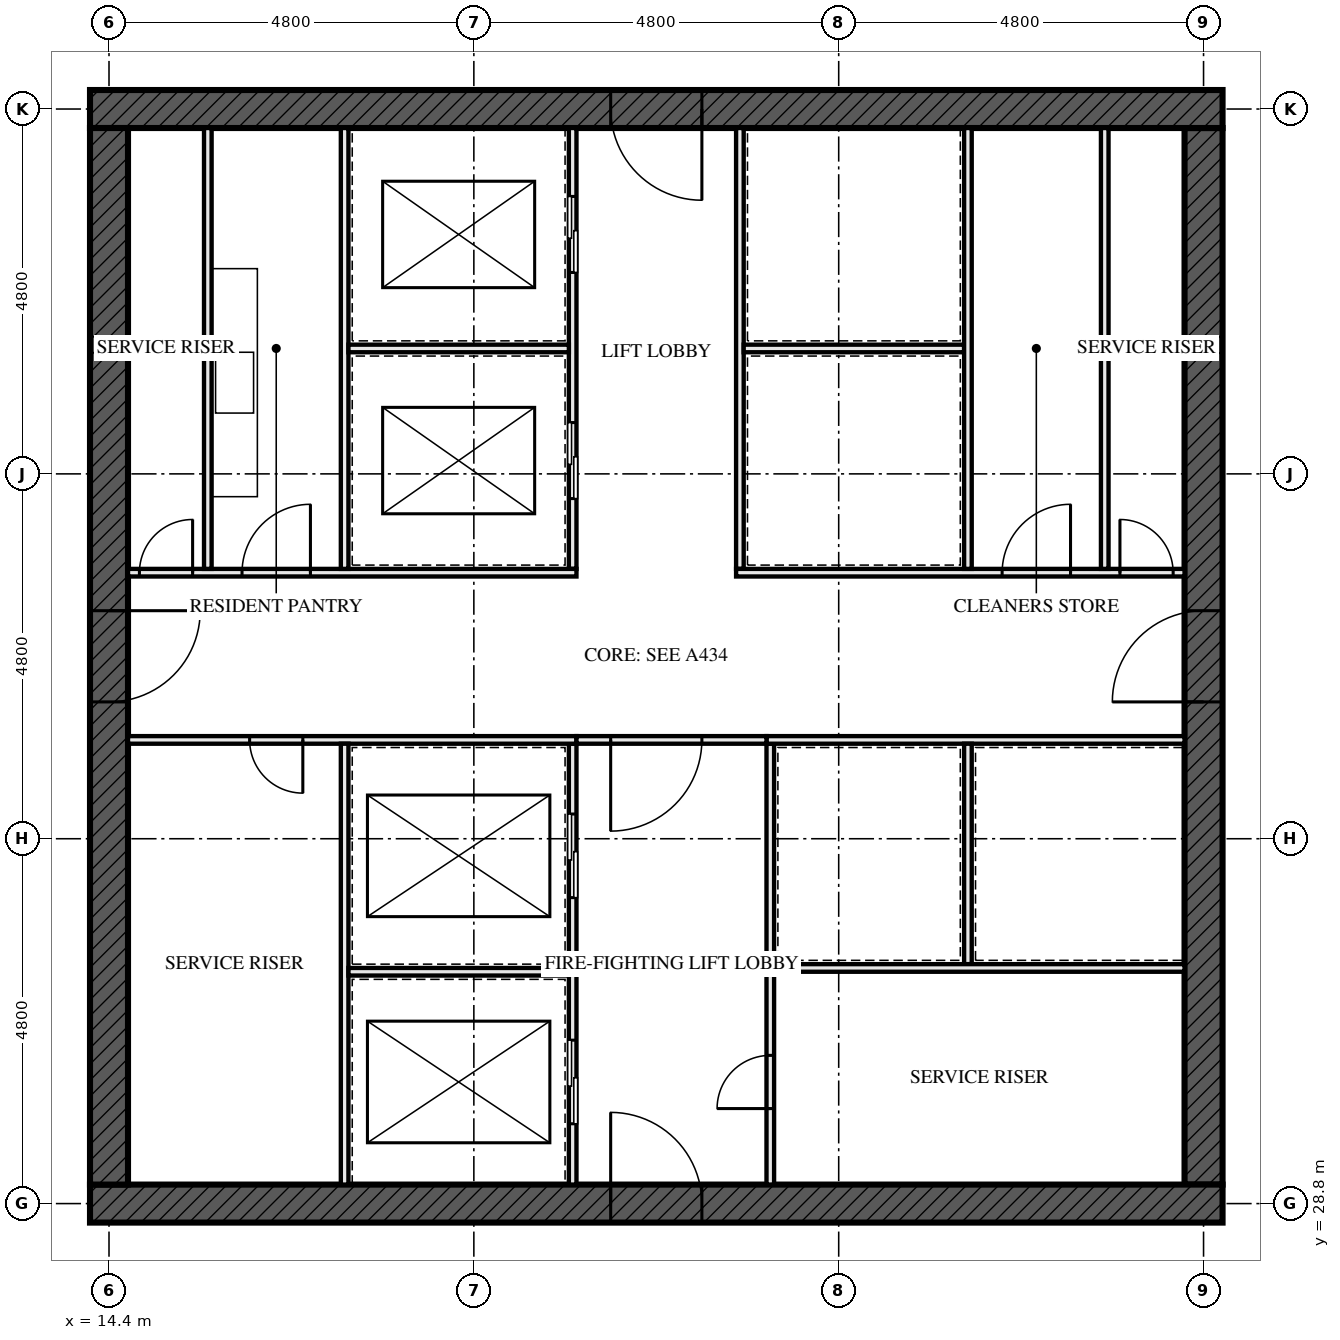
"""IFC4 building model, lengths in metres.
Left out: names, types, materials, properties, quantities, classifications, styles, units other than length and angle.
Written with IfcOpenShell. Run it as: python <this file> out.ifc"""

import sys

from ifc_helpers import new_model, si_unit, direction, frame, frame_2d, origin, place, context, subcontext, project, spatial, rectangle, extrude, element, fill, save


model = new_model("IFC4")
c1 = context("Model", 3, precision=1e-05, world=origin(), true_north=direction((0.0, 1.0)))
c2 = subcontext(c1, "Body", "Model", "MODEL_VIEW")
j1 = project(units=[si_unit("LENGTHUNIT", "METRE"), si_unit("PLANEANGLEUNIT", "RADIAN")], contexts=[c1])
p1 = place(None, origin())
s1 = spatial("IfcSite", under=j1, at=p1, CompositionType="ELEMENT")
p2 = place(p1, origin())
s2 = spatial("IfcBuilding", under=s1, at=p2, CompositionType="ELEMENT")
p3 = place(p2, frame((0.0, 0.0, 79.5)))
s3 = spatial("IfcBuildingStorey", under=s2, at=p3, CompositionType="ELEMENT", Elevation=79.5)
p4 = place(p3, frame((14.15, 28.8, -0.25), z_axis=(0.0, 0.0, 1.0), x_axis=(1.0, 0.0, 0.0)))
e1 = element("IfcWall", 1, at=p4, inside=s3, PredefinedType="SHEAR", context=c2, shape_type="SweptSolid", body=[
    extrude(rectangle(XDim=14.9, YDim=0.5, at=frame_2d((7.45, 0.0))), origin(), (0.0, 0.0, 1.0), 4.58),
])
p5 = place(p4, frame((6.85, 0.0, 0.25)))
e2 = element("IfcOpeningElement", 2, at=p5, cuts=e1, PredefinedType="OPENING", context=c2, shape_type="SweptSolid", body=[
    extrude(rectangle(XDim=1.2, YDim=2.1, at=frame_2d((0.6, 1.05))), frame((0.0, 0.26, 0.0), z_axis=(0.0, -1.0, 0.0), x_axis=(1.0, 0.0, 0.0)), (0.0, 0.0, 1.0), 0.521),
])
p6 = place(p3, frame((29.05, 43.2, -0.25), z_axis=(0.0, 0.0, 1.0), x_axis=(-1.0, 0.0, 0.0)))
e3 = element("IfcWall", 3, at=p6, inside=s3, PredefinedType="SHEAR", context=c2, shape_type="SweptSolid", body=[
    extrude(rectangle(XDim=14.9, YDim=0.5, at=frame_2d((7.45, 0.0))), origin(), (0.0, 0.0, 1.0), 4.58),
])
p7 = place(p6, frame((6.85, 0.0, 0.25)))
e4 = element("IfcOpeningElement", 4, at=p7, cuts=e3, PredefinedType="OPENING", context=c2, shape_type="SweptSolid", body=[
    extrude(rectangle(XDim=1.2, YDim=2.1, at=frame_2d((0.6, 1.05))), frame((0.0, 0.26, 0.0), z_axis=(0.0, -1.0, 0.0), x_axis=(1.0, 0.0, 0.0)), (0.0, 0.0, 1.0), 0.521),
])
p8 = place(p3, frame((14.4, 42.95, -0.25), z_axis=(0.0, 0.0, 1.0), x_axis=(0.0, -1.0, 0.0)))
e5 = element("IfcWall", 5, at=p8, inside=s3, PredefinedType="SHEAR", context=c2, shape_type="SweptSolid", body=[
    extrude(rectangle(XDim=13.9, YDim=0.5, at=frame_2d((6.95, 0.0))), origin(), (0.0, 0.0, 1.0), 4.58),
])
p9 = place(p8, frame((6.35, 0.0, 0.25)))
e6 = element("IfcOpeningElement", 6, at=p9, cuts=e5, PredefinedType="OPENING", context=c2, shape_type="SweptSolid", body=[
    extrude(rectangle(XDim=1.2, YDim=2.1, at=frame_2d((0.6, 1.05))), frame((0.0, 0.26, 0.0), z_axis=(0.0, -1.0, 0.0), x_axis=(1.0, 0.0, 0.0)), (0.0, 0.0, 1.0), 0.521),
])
p10 = place(p3, frame((28.8, 29.05, -0.25), z_axis=(0.0, 0.0, 1.0), x_axis=(0.0, 1.0, 0.0)))
e7 = element("IfcWall", 7, at=p10, inside=s3, PredefinedType="SHEAR", context=c2, shape_type="SweptSolid", body=[
    extrude(rectangle(XDim=13.9, YDim=0.5, at=frame_2d((6.95, 0.0))), origin(), (0.0, 0.0, 1.0), 4.58),
])
p11 = place(p10, frame((6.35, 0.0, 0.25)))
e8 = element("IfcOpeningElement", 8, at=p11, cuts=e7, PredefinedType="OPENING", context=c2, shape_type="SweptSolid", body=[
    extrude(rectangle(XDim=1.2, YDim=2.1, at=frame_2d((0.6, 1.05))), frame((0.0, 0.26, 0.0), z_axis=(0.0, -1.0, 0.0), x_axis=(1.0, 0.0, 0.0)), (0.0, 0.0, 1.0), 0.521),
])
for number, where, z_axis, x_axis in (
    (9, (15.7, 37.15, 0.0), (0.0, 0.0, 1.0), (0.0, 1.0, 0.0)),
    (10, (27.5, 37.15, 0.0), (0.0, 0.0, 1.0), (0.0, 1.0, 0.0)),
):
    element("IfcWall", number, at=place(p3, frame(where, z_axis=z_axis, x_axis=x_axis)), inside=s3, PredefinedType="SOLIDWALL", context=c2, shape_type="SweptSolid", body=[
        extrude(rectangle(XDim=5.8, YDim=0.1, at=frame_2d((2.9, 0.0))), origin(), (0.0, 0.0, 1.0), 4.33),
    ])
p12 = place(p3, frame((20.5, 29.05, 0.0), z_axis=(0.0, 0.0, 1.0), x_axis=(0.0, 1.0, 0.0)))
e11 = element("IfcWall", 11, at=p12, inside=s3, PredefinedType="SOLIDWALL", context=c2, shape_type="SweptSolid", body=[
    extrude(rectangle(XDim=5.8, YDim=0.1, at=frame_2d((2.9, 0.0))), origin(), (0.0, 0.0, 1.0), 4.33),
])
p13 = place(p12, frame((0.8, 0.0, 0.0)))
e12 = element("IfcOpeningElement", 12, at=p13, cuts=e11, PredefinedType="OPENING", context=c2, shape_type="SweptSolid", body=[
    extrude(rectangle(XDim=1.1, YDim=2.3, at=frame_2d((0.55, 1.15))), frame((0.0, 0.061, 0.0), z_axis=(0.0, -1.0, 0.0), x_axis=(1.0, 0.0, 0.0)), (0.0, 0.0, 1.0), 0.121),
])
p14 = place(p12, frame((3.775, 0.0, 0.0)))
e13 = element("IfcOpeningElement", 13, at=p14, cuts=e11, PredefinedType="OPENING", context=c2, shape_type="SweptSolid", body=[
    extrude(rectangle(XDim=1.1, YDim=2.3, at=frame_2d((0.55, 1.15))), frame((0.0, 0.061, 0.0), z_axis=(0.0, -1.0, 0.0), x_axis=(1.0, 0.0, 0.0)), (0.0, 0.0, 1.0), 0.121),
])
p15 = place(p3, frame((20.5, 37.15, 0.0), z_axis=(0.0, 0.0, 1.0), x_axis=(0.0, 1.0, 0.0)))
e14 = element("IfcWall", 14, at=p15, inside=s3, PredefinedType="SOLIDWALL", context=c2, shape_type="SweptSolid", body=[
    extrude(rectangle(XDim=5.8, YDim=0.1, at=frame_2d((2.9, 0.0))), origin(), (0.0, 0.0, 1.0), 4.33),
])
p16 = place(p15, frame((0.925, 0.0, 0.0)))
e15 = element("IfcOpeningElement", 15, at=p16, cuts=e14, PredefinedType="OPENING", context=c2, shape_type="SweptSolid", body=[
    extrude(rectangle(XDim=1.0, YDim=2.1, at=frame_2d((0.5, 1.05))), frame((0.0, 0.061, 0.0), z_axis=(0.0, -1.0, 0.0), x_axis=(1.0, 0.0, 0.0)), (0.0, 0.0, 1.0), 0.121),
])
p17 = place(p15, frame((3.9, 0.0, 0.0)))
e16 = element("IfcOpeningElement", 16, at=p17, cuts=e14, PredefinedType="OPENING", context=c2, shape_type="SweptSolid", body=[
    extrude(rectangle(XDim=1.0, YDim=2.1, at=frame_2d((0.5, 1.05))), frame((0.0, 0.061, 0.0), z_axis=(0.0, -1.0, 0.0), x_axis=(1.0, 0.0, 0.0)), (0.0, 0.0, 1.0), 0.121),
])
p18 = place(p3, frame((22.7, 37.15, 0.0), z_axis=(0.0, 0.0, 1.0), x_axis=(0.0, 1.0, 0.0)))
e17 = element("IfcWall", 17, at=p18, inside=s3, PredefinedType="SOLIDWALL", context=c2, shape_type="SweptSolid", body=[
    extrude(rectangle(XDim=5.8, YDim=0.1, at=frame_2d((2.9, 0.0))), origin(), (0.0, 0.0, 1.0), 4.33),
])
p19 = place(p3, frame((23.1, 29.05, 0.0), z_axis=(0.0, 0.0, 1.0), x_axis=(0.0, 1.0, 0.0)))
e18 = element("IfcWall", 18, at=p19, inside=s3, PredefinedType="SOLIDWALL", context=c2, shape_type="SweptSolid", body=[
    extrude(rectangle(XDim=5.8, YDim=0.1, at=frame_2d((2.9, 0.0))), origin(), (0.0, 0.0, 1.0), 4.33),
])
p20 = place(p19, frame((1.0, 0.0, 0.0)))
e19 = element("IfcOpeningElement", 19, at=p20, cuts=e18, PredefinedType="OPENING", context=c2, shape_type="SweptSolid", body=[
    extrude(rectangle(XDim=0.7, YDim=2.1, at=frame_2d((0.35, 1.05))), frame((0.0, 0.061, 0.0), z_axis=(0.0, -1.0, 0.0), x_axis=(1.0, 0.0, 0.0)), (0.0, 0.0, 1.0), 0.121),
])
p21 = place(p3, frame((14.65, 34.9, 0.0), z_axis=(0.0, 0.0, 1.0), x_axis=(1.0, 0.0, 0.0)))
e20 = element("IfcWall", 20, at=p21, inside=s3, PredefinedType="SOLIDWALL", context=c2, shape_type="SweptSolid", body=[
    extrude(rectangle(XDim=5.9, YDim=0.1, at=frame_2d((2.95, 0.0))), origin(), (0.0, 0.0, 1.0), 4.33),
])
p22 = place(p21, frame((1.6, 0.0, 0.0)))
e21 = element("IfcOpeningElement", 21, at=p22, cuts=e20, PredefinedType="OPENING", context=c2, shape_type="SweptSolid", body=[
    extrude(rectangle(XDim=0.7, YDim=2.1, at=frame_2d((0.35, 1.05))), frame((0.0, 0.061, 0.0), z_axis=(0.0, -1.0, 0.0), x_axis=(1.0, 0.0, 0.0)), (0.0, 0.0, 1.0), 0.121),
])
p23 = place(p3, frame((23.05, 34.9, 0.0), z_axis=(0.0, 0.0, 1.0), x_axis=(1.0, 0.0, 0.0)))
e22 = element("IfcWall", 22, at=p23, inside=s3, PredefinedType="SOLIDWALL", context=c2, shape_type="SweptSolid", body=[
    extrude(rectangle(XDim=5.5, YDim=0.1, at=frame_2d((2.75, 0.0))), origin(), (0.0, 0.0, 1.0), 4.33),
])
p24 = place(p3, frame((14.65, 37.1, 0.0), z_axis=(0.0, 0.0, 1.0), x_axis=(1.0, 0.0, 0.0)))
e23 = element("IfcWall", 23, at=p24, inside=s3, PredefinedType="SOLIDWALL", context=c2, shape_type="SweptSolid", body=[
    extrude(rectangle(XDim=5.9, YDim=0.1, at=frame_2d((2.95, 0.0))), origin(), (0.0, 0.0, 1.0), 4.33),
])
p25 = place(p24, frame((0.15, 0.0, 0.0)))
e24 = element("IfcOpeningElement", 24, at=p25, cuts=e23, PredefinedType="OPENING", context=c2, shape_type="SweptSolid", body=[
    extrude(rectangle(XDim=0.7, YDim=2.1, at=frame_2d((0.35, 1.05))), frame((0.0, 0.061, 0.0), z_axis=(0.0, -1.0, 0.0), x_axis=(1.0, 0.0, 0.0)), (0.0, 0.0, 1.0), 0.121),
])
p26 = place(p24, frame((1.5, 0.0, 0.0)))
e25 = element("IfcOpeningElement", 25, at=p26, cuts=e23, PredefinedType="OPENING", context=c2, shape_type="SweptSolid", body=[
    extrude(rectangle(XDim=0.9, YDim=2.1, at=frame_2d((0.45, 1.05))), frame((0.0, 0.061, 0.0), z_axis=(0.0, -1.0, 0.0), x_axis=(1.0, 0.0, 0.0)), (0.0, 0.0, 1.0), 0.121),
])
p27 = place(p3, frame((22.65, 37.1, 0.0), z_axis=(0.0, 0.0, 1.0), x_axis=(1.0, 0.0, 0.0)))
e26 = element("IfcWall", 26, at=p27, inside=s3, PredefinedType="SOLIDWALL", context=c2, shape_type="SweptSolid", body=[
    extrude(rectangle(XDim=5.9, YDim=0.1, at=frame_2d((2.95, 0.0))), origin(), (0.0, 0.0, 1.0), 4.33),
])
p28 = place(p27, frame((3.5, 0.0, 0.0)))
e27 = element("IfcOpeningElement", 27, at=p28, cuts=e26, PredefinedType="OPENING", context=c2, shape_type="SweptSolid", body=[
    extrude(rectangle(XDim=0.9, YDim=2.1, at=frame_2d((0.45, 1.05))), frame((0.0, 0.061, 0.0), z_axis=(0.0, -1.0, 0.0), x_axis=(1.0, 0.0, 0.0)), (0.0, 0.0, 1.0), 0.121),
])
p29 = place(p27, frame((5.05, 0.0, 0.0)))
e28 = element("IfcOpeningElement", 28, at=p29, cuts=e26, PredefinedType="OPENING", context=c2, shape_type="SweptSolid", body=[
    extrude(rectangle(XDim=0.7, YDim=2.1, at=frame_2d((0.35, 1.05))), frame((0.0, 0.061, 0.0), z_axis=(0.0, -1.0, 0.0), x_axis=(1.0, 0.0, 0.0)), (0.0, 0.0, 1.0), 0.121),
])
p30 = place(p3, frame((20.55, 34.9, 0.0), z_axis=(0.0, 0.0, 1.0), x_axis=(1.0, 0.0, 0.0)))
e29 = element("IfcWall", 29, at=p30, inside=s3, PredefinedType="SOLIDWALL", context=c2, shape_type="SweptSolid", body=[
    extrude(rectangle(XDim=2.5, YDim=0.1, at=frame_2d((1.25, 0.0))), origin(), (0.0, 0.0, 1.0), 4.33),
])
p31 = place(p30, frame((0.45, 0.0, 0.0)))
e30 = element("IfcOpeningElement", 30, at=p31, cuts=e29, PredefinedType="OPENING", context=c2, shape_type="SweptSolid", body=[
    extrude(rectangle(XDim=1.2, YDim=2.1, at=frame_2d((0.6, 1.05))), frame((0.0, 0.061, 0.0), z_axis=(0.0, -1.0, 0.0), x_axis=(1.0, 0.0, 0.0)), (0.0, 0.0, 1.0), 0.121),
])
p32 = place(p3, frame((17.5, 29.05, 0.0), z_axis=(0.0, 0.0, 1.0), x_axis=(0.0, 1.0, 0.0)))
e31 = element("IfcWall", 31, at=p32, inside=s3, PredefinedType="SOLIDWALL", context=c2, shape_type="SweptSolid", body=[
    extrude(rectangle(XDim=5.8, YDim=0.1, at=frame_2d((2.9, 0.0))), origin(), (0.0, 0.0, 1.0), 4.33),
])
p33 = place(p3, frame((17.55, 31.85, 0.0), z_axis=(0.0, 0.0, 1.0), x_axis=(1.0, 0.0, 0.0)))
e32 = element("IfcWall", 32, at=p33, inside=s3, PredefinedType="SOLIDWALL", context=c2, shape_type="SweptSolid", body=[
    extrude(rectangle(XDim=2.9, YDim=0.1, at=frame_2d((1.45, 0.0))), origin(), (0.0, 0.0, 1.0), 4.33),
])
p34 = place(p3, frame((17.5, 37.15, 0.0), z_axis=(0.0, 0.0, 1.0), x_axis=(0.0, 1.0, 0.0)))
e33 = element("IfcWall", 33, at=p34, inside=s3, PredefinedType="SOLIDWALL", context=c2, shape_type="SweptSolid", body=[
    extrude(rectangle(XDim=5.8, YDim=0.1, at=frame_2d((2.9, 0.0))), origin(), (0.0, 0.0, 1.0), 4.33),
])
for number, where, z_axis, x_axis in (
    (34, (17.55, 40.05, 0.0), (0.0, 0.0, 1.0), (1.0, 0.0, 0.0)),
    (35, (22.75, 40.05, 0.0), (0.0, 0.0, 1.0), (1.0, 0.0, 0.0)),
):
    element("IfcWall", number, at=place(p3, frame(where, z_axis=z_axis, x_axis=x_axis)), inside=s3, PredefinedType="SOLIDWALL", context=c2, shape_type="SweptSolid", body=[
        extrude(rectangle(XDim=2.9, YDim=0.1, at=frame_2d((1.45, 0.0))), origin(), (0.0, 0.0, 1.0), 4.33),
    ])
p35 = place(p3, frame((25.7, 37.15, 0.0), z_axis=(0.0, 0.0, 1.0), x_axis=(0.0, 1.0, 0.0)))
e36 = element("IfcWall", 36, at=p35, inside=s3, PredefinedType="SOLIDWALL", context=c2, shape_type="SweptSolid", body=[
    extrude(rectangle(XDim=5.8, YDim=0.1, at=frame_2d((2.9, 0.0))), origin(), (0.0, 0.0, 1.0), 4.33),
])
p36 = place(p3, frame((25.7, 31.95, 0.0), z_axis=(0.0, 0.0, 1.0), x_axis=(0.0, 1.0, 0.0)))
e37 = element("IfcWall", 37, at=p36, inside=s3, PredefinedType="SOLIDWALL", context=c2, shape_type="SweptSolid", body=[
    extrude(rectangle(XDim=2.9, YDim=0.1, at=frame_2d((1.45, 0.0))), origin(), (0.0, 0.0, 1.0), 4.33),
])
p37 = place(p3, frame((23.15, 31.9, 0.0), z_axis=(0.0, 0.0, 1.0), x_axis=(1.0, 0.0, 0.0)))
e38 = element("IfcWall", 38, at=p37, inside=s3, PredefinedType="SOLIDWALL", context=c2, shape_type="SweptSolid", body=[
    extrude(rectangle(XDim=5.4, YDim=0.1, at=frame_2d((2.7, 0.0))), origin(), (0.0, 0.0, 1.0), 4.33),
])
p38 = place(p13, origin())
e39 = element("IfcDoor", 39, at=p38, inside=s3, OperationType="SLIDING_TO_LEFT", PredefinedType="DOOR", context=c2, shape_type="SweptSolid", body=[
    extrude(rectangle(XDim=1.1, YDim=2.3, at=frame_2d((0.55, 1.15))), frame((0.0, 0.05, 0.0), z_axis=(0.0, -1.0, 0.0), x_axis=(1.0, 0.0, 0.0)), (0.0, 0.0, 1.0), 0.1),
])
fill(e12, e39)
p39 = place(p14, origin())
e40 = element("IfcDoor", 40, at=p39, inside=s3, OperationType="SLIDING_TO_LEFT", PredefinedType="DOOR", context=c2, shape_type="SweptSolid", body=[
    extrude(rectangle(XDim=1.1, YDim=2.3, at=frame_2d((0.55, 1.15))), frame((0.0, 0.05, 0.0), z_axis=(0.0, -1.0, 0.0), x_axis=(1.0, 0.0, 0.0)), (0.0, 0.0, 1.0), 0.1),
])
fill(e13, e40)
p40 = place(p16, origin())
e41 = element("IfcDoor", 41, at=p40, inside=s3, OperationType="SLIDING_TO_LEFT", PredefinedType="DOOR", context=c2, shape_type="SweptSolid", body=[
    extrude(rectangle(XDim=1.0, YDim=2.1, at=frame_2d((0.5, 1.05))), frame((0.0, 0.05, 0.0), z_axis=(0.0, -1.0, 0.0), x_axis=(1.0, 0.0, 0.0)), (0.0, 0.0, 1.0), 0.1),
])
fill(e15, e41)
p41 = place(p17, origin())
e42 = element("IfcDoor", 42, at=p41, inside=s3, OperationType="SLIDING_TO_LEFT", PredefinedType="DOOR", context=c2, shape_type="SweptSolid", body=[
    extrude(rectangle(XDim=1.0, YDim=2.1, at=frame_2d((0.5, 1.05))), frame((0.0, 0.05, 0.0), z_axis=(0.0, -1.0, 0.0), x_axis=(1.0, 0.0, 0.0)), (0.0, 0.0, 1.0), 0.1),
])
fill(e16, e42)
p42 = place(p20, origin())
e43 = element("IfcDoor", 43, at=p42, inside=s3, OperationType="SINGLE_SWING_RIGHT", PredefinedType="DOOR", context=c2, shape_type="SweptSolid", body=[
    extrude(rectangle(XDim=0.7, YDim=2.1, at=frame_2d((0.35, 1.05))), frame((0.0, 0.027, 0.0), z_axis=(0.0, -1.0, 0.0), x_axis=(1.0, 0.0, 0.0)), (0.0, 0.0, 1.0), 0.054),
])
fill(e19, e43)
p43 = place(p22, frame((0.7, 0.0, 0.0), z_axis=(0.0, 0.0, 1.0), x_axis=(-1.0, 0.0, 0.0)))
e44 = element("IfcDoor", 44, at=p43, inside=s3, OperationType="SINGLE_SWING_RIGHT", PredefinedType="DOOR", context=c2, shape_type="SweptSolid", body=[
    extrude(rectangle(XDim=0.7, YDim=2.1, at=frame_2d((0.35, 1.05))), frame((0.0, 0.027, 0.0), z_axis=(0.0, -1.0, 0.0), x_axis=(1.0, 0.0, 0.0)), (0.0, 0.0, 1.0), 0.054),
])
fill(e21, e44)
p44 = place(p25, origin())
e45 = element("IfcDoor", 45, at=p44, inside=s3, OperationType="SINGLE_SWING_LEFT", PredefinedType="DOOR", context=c2, shape_type="SweptSolid", body=[
    extrude(rectangle(XDim=0.7, YDim=2.1, at=frame_2d((0.35, 1.05))), frame((0.0, 0.027, 0.0), z_axis=(0.0, -1.0, 0.0), x_axis=(1.0, 0.0, 0.0)), (0.0, 0.0, 1.0), 0.054),
])
fill(e24, e45)
p45 = place(p26, origin())
e46 = element("IfcDoor", 46, at=p45, inside=s3, OperationType="SINGLE_SWING_LEFT", PredefinedType="DOOR", context=c2, shape_type="SweptSolid", body=[
    extrude(rectangle(XDim=0.9, YDim=2.1, at=frame_2d((0.45, 1.05))), frame((0.0, 0.027, 0.0), z_axis=(0.0, -1.0, 0.0), x_axis=(1.0, 0.0, 0.0)), (0.0, 0.0, 1.0), 0.054),
])
fill(e25, e46)
p46 = place(p28, origin())
e47 = element("IfcDoor", 47, at=p46, inside=s3, OperationType="SINGLE_SWING_LEFT", PredefinedType="DOOR", context=c2, shape_type="SweptSolid", body=[
    extrude(rectangle(XDim=0.9, YDim=2.1, at=frame_2d((0.45, 1.05))), frame((0.0, 0.027, 0.0), z_axis=(0.0, -1.0, 0.0), x_axis=(1.0, 0.0, 0.0)), (0.0, 0.0, 1.0), 0.054),
])
fill(e27, e47)
p47 = place(p29, origin())
e48 = element("IfcDoor", 48, at=p47, inside=s3, OperationType="SINGLE_SWING_RIGHT", PredefinedType="DOOR", context=c2, shape_type="SweptSolid", body=[
    extrude(rectangle(XDim=0.7, YDim=2.1, at=frame_2d((0.35, 1.05))), frame((0.0, 0.027, 0.0), z_axis=(0.0, -1.0, 0.0), x_axis=(1.0, 0.0, 0.0)), (0.0, 0.0, 1.0), 0.054),
])
fill(e28, e48)
p48 = place(p31, frame((1.2, 0.0, 0.0), z_axis=(0.0, 0.0, 1.0), x_axis=(-1.0, 0.0, 0.0)))
e49 = element("IfcDoor", 49, at=p48, inside=s3, OperationType="SINGLE_SWING_LEFT", PredefinedType="DOOR", context=c2, shape_type="SweptSolid", body=[
    extrude(rectangle(XDim=1.2, YDim=2.1, at=frame_2d((0.6, 1.05))), frame((0.0, 0.027, 0.0), z_axis=(0.0, -1.0, 0.0), x_axis=(1.0, 0.0, 0.0)), (0.0, 0.0, 1.0), 0.054),
])
fill(e30, e49)
p49 = place(p5, origin())
e50 = element("IfcDoor", 50, at=p49, inside=s3, OperationType="SINGLE_SWING_LEFT", PredefinedType="DOOR", context=c2, shape_type="SweptSolid", body=[
    extrude(rectangle(XDim=1.2, YDim=2.1, at=frame_2d((0.6, 1.05))), frame((0.0, 0.027, 0.0), z_axis=(0.0, -1.0, 0.0), x_axis=(1.0, 0.0, 0.0)), (0.0, 0.0, 1.0), 0.054),
])
fill(e2, e50)
p50 = place(p9, origin())
e51 = element("IfcDoor", 51, at=p50, inside=s3, OperationType="SINGLE_SWING_LEFT", PredefinedType="DOOR", context=c2, shape_type="SweptSolid", body=[
    extrude(rectangle(XDim=1.2, YDim=2.1, at=frame_2d((0.6, 1.05))), frame((0.0, 0.027, 0.0), z_axis=(0.0, -1.0, 0.0), x_axis=(1.0, 0.0, 0.0)), (0.0, 0.0, 1.0), 0.054),
])
fill(e6, e51)
p51 = place(p11, origin())
e52 = element("IfcDoor", 52, at=p51, inside=s3, OperationType="SINGLE_SWING_LEFT", PredefinedType="DOOR", context=c2, shape_type="SweptSolid", body=[
    extrude(rectangle(XDim=1.2, YDim=2.1, at=frame_2d((0.6, 1.05))), frame((0.0, 0.027, 0.0), z_axis=(0.0, -1.0, 0.0), x_axis=(1.0, 0.0, 0.0)), (0.0, 0.0, 1.0), 0.054),
])
fill(e8, e52)
p52 = place(p7, origin())
e53 = element("IfcDoor", 53, at=p52, inside=s3, OperationType="SINGLE_SWING_LEFT", PredefinedType="DOOR", context=c2, shape_type="SweptSolid", body=[
    extrude(rectangle(XDim=1.2, YDim=2.1, at=frame_2d((0.6, 1.05))), frame((0.0, 0.027, 0.0), z_axis=(0.0, -1.0, 0.0), x_axis=(1.0, 0.0, 0.0)), (0.0, 0.0, 1.0), 0.054),
])
fill(e4, e53)
save(model, sys.argv[1])
